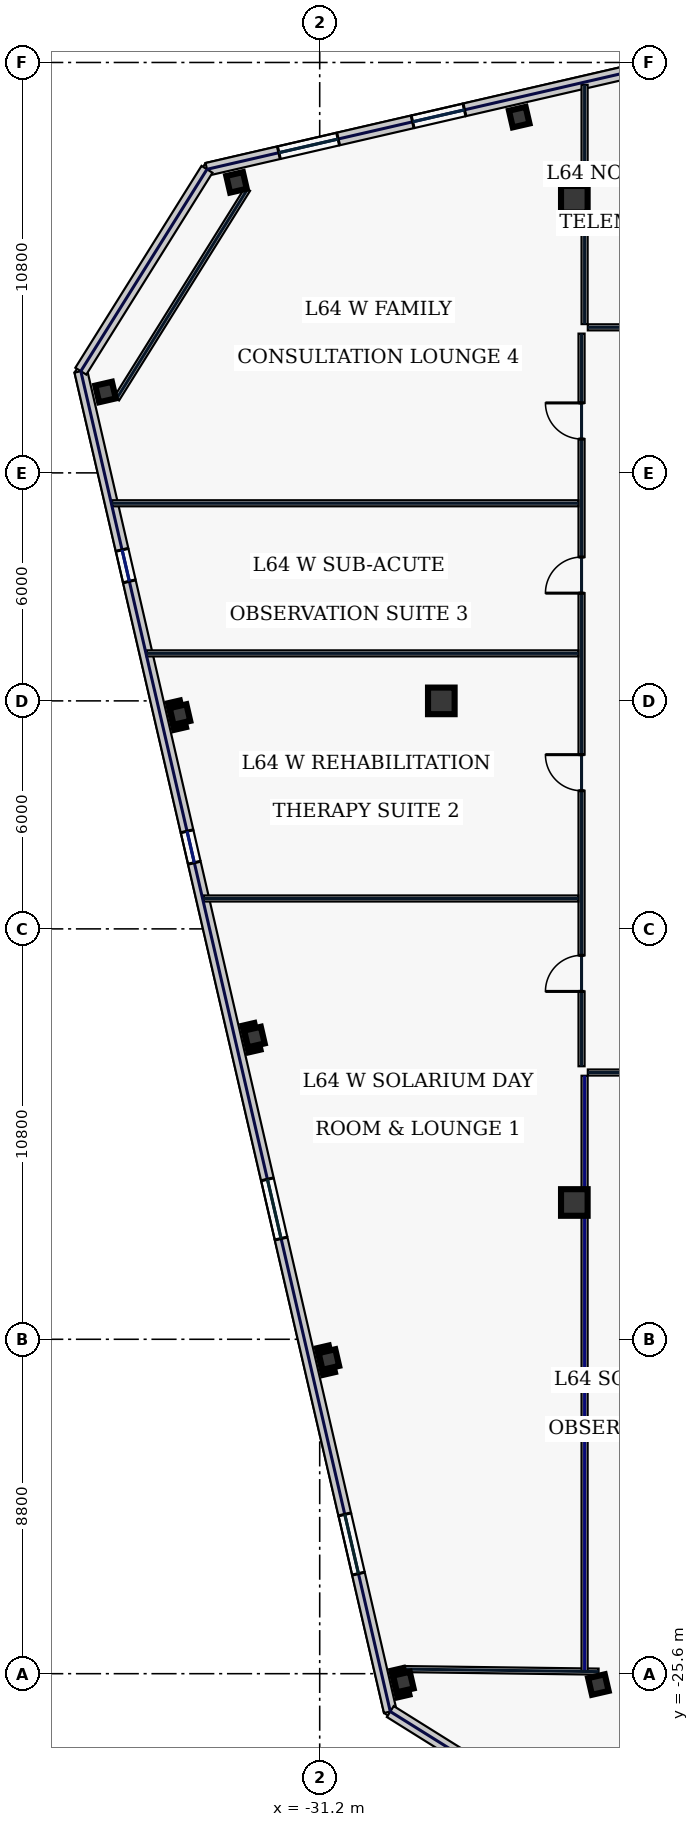
"""IFC4 building model, lengths in metres.
Left out: names, types, materials, properties, quantities, classifications, styles, units other than length and angle.
Written with IfcOpenShell. Run it as: python <this file> out.ifc"""

import sys

from ifc_helpers import new_model, si_unit, direction, frame, frame_2d, origin, origin_2d, place, context, subcontext, project, spatial, rectangle, hollow_rectangle, extrude, element, fill, save


model = new_model("IFC4")
c1 = context("Model", 3, precision=1e-05, world=origin(), true_north=direction((0.0, 1.0)))
c2 = subcontext(c1, "Body", "Model", "MODEL_VIEW")
j1 = project(units=[si_unit("LENGTHUNIT", "METRE"), si_unit("PLANEANGLEUNIT", "RADIAN")], contexts=[c1])
p1 = place(None, origin())
s1 = spatial("IfcSite", under=j1, at=p1, CompositionType="ELEMENT")
p2 = place(p1, origin())
s2 = spatial("IfcBuilding", under=s1, at=p2, CompositionType="ELEMENT")
p3 = place(p2, frame((0.0, 0.0, 277.0)))
s3 = spatial("IfcBuildingStorey", under=s2, at=p3, CompositionType="ELEMENT", Elevation=277.0)
for number, where, z_axis, x_axis in (
    (1, (-24.5, -13.2, 0.0), (0.0, 0.0, 1.0), (1.0, 0.0, 0.0)),
    (2, (-24.5, 13.2, 0.0), (0.0, 0.0, 1.0), (1.0, 0.0, 0.0)),
    (3, (-28.0, 0.0, 0.0), (0.0, 0.0, 1.0), (1.0, 0.0, 0.0)),
):
    element("IfcColumn", number, at=place(p3, frame(where, z_axis=z_axis, x_axis=x_axis)), inside=s3, PredefinedType="COLUMN", context=c2, shape_type="SweptSolid", body=[
        extrude(hollow_rectangle(XDim=0.7, YDim=0.7, WallThickness=0.032, at=origin_2d()), origin(), (0.0, 0.0, 1.0), 3.74),
    ])
for number, where, z_axis, x_axis in (
    (4, (-23.867, -25.886, 0.0), (0.0, 0.0, 1.0), (0.974, 0.225, 0.0)),
    (5, (-25.95, 15.362, 0.0), (0.0, 0.0, 1.0), (0.974, 0.225, 0.0)),
    (6, (-33.389, 13.645, 0.0), (0.0, 0.0, 1.0), (0.974, 0.225, 0.0)),
    (7, (-36.836, 8.128, 0.0), (0.0, 0.0, 1.0), (0.974, 0.225, 0.0)),
    (8, (-34.877, -0.359, 0.0), (0.0, 0.0, 1.0), (0.974, 0.225, 0.0)),
    (9, (-32.917, -8.845, 0.0), (0.0, 0.0, 1.0), (0.974, 0.225, 0.0)),
    (10, (-30.958, -17.332, 0.0), (0.0, 0.0, 1.0), (0.974, 0.225, 0.0)),
    (11, (-28.999, -25.819, 0.0), (0.0, 0.0, 1.0), (0.974, 0.225, 0.0)),
):
    element("IfcColumn", number, at=place(p3, frame(where, z_axis=z_axis, x_axis=x_axis)), inside=s3, PredefinedType="COLUMN", context=c2, shape_type="SweptSolid", body=[
        extrude(hollow_rectangle(XDim=0.45, YDim=0.45, WallThickness=0.022, at=origin_2d()), origin(), (0.0, 0.0, 1.0), 3.74),
    ])
p4 = place(p3, frame((-24.03, -29.916, 0.0), z_axis=(0.0, 0.0, 1.0), x_axis=(0.974371201193, 0.224946131964, 0.0)))
e12 = element("IfcWall", 12, at=p4, inside=s3, PredefinedType="STANDARD", context=c2, shape_type="SweptSolid", body=[
    extrude(rectangle(XDim=12.35, YDim=0.34, at=frame_2d((6.175, 0.0))), origin(), (0.0, 0.0, 1.0), 3.74),
])
p5 = place(p4, frame((2.35, 0.0, 0.9)))
e13 = element("IfcOpeningElement", 13, at=p5, cuts=e12, PredefinedType="OPENING", context=c2, shape_type="SweptSolid", body=[
    extrude(rectangle(XDim=1.5, YDim=2.0, at=frame_2d((0.75, 1.0))), frame((0.0, 0.18, 0.0), z_axis=(0.0, -1.0, 0.0), x_axis=(1.0, 0.0, 0.0)), (0.0, 0.0, 1.0), 0.36),
])
p6 = place(p4, frame((5.817, 0.0, 0.9)))
e14 = element("IfcOpeningElement", 14, at=p6, cuts=e12, PredefinedType="OPENING", context=c2, shape_type="SweptSolid", body=[
    extrude(rectangle(XDim=1.5, YDim=2.0, at=frame_2d((0.75, 1.0))), frame((0.0, 0.18, 0.0), z_axis=(0.0, -1.0, 0.0), x_axis=(1.0, 0.0, 0.0)), (0.0, 0.0, 1.0), 0.36),
])
p7 = place(p4, frame((9.886, 0.0, 0.9)))
e15 = element("IfcOpeningElement", 15, at=p7, cuts=e12, PredefinedType="OPENING", context=c2, shape_type="SweptSolid", body=[
    extrude(rectangle(XDim=1.5, YDim=2.0, at=frame_2d((0.75, 1.0))), frame((0.0, 0.18, 0.0), z_axis=(0.0, -1.0, 0.0), x_axis=(1.0, 0.0, 0.0)), (0.0, 0.0, 1.0), 0.36),
])
p8 = place(p3, frame((-17.245, 17.895, 0.0), z_axis=(0.0, 0.0, 1.0), x_axis=(-0.97437318493, -0.224937539085, 0.0)))
e16 = element("IfcWall", 16, at=p8, inside=s3, PredefinedType="STANDARD", context=c2, shape_type="SweptSolid", body=[
    extrude(rectangle(XDim=17.366, YDim=0.34, at=frame_2d((8.683, 0.0))), origin(), (0.0, 0.0, 1.0), 3.74),
])
p9 = place(p8, frame((13.825, 0.0, 0.22)))
e17 = element("IfcOpeningElement", 17, at=p9, cuts=e16, PredefinedType="OPENING", context=c2, shape_type="SweptSolid", body=[
    extrude(rectangle(XDim=1.6, YDim=1.2, at=frame_2d((0.8, 0.6))), frame((0.0, 0.18, 0.0), z_axis=(0.0, -1.0, 0.0), x_axis=(1.0, 0.0, 0.0)), (0.0, 0.0, 1.0), 0.36),
])
p10 = place(p8, frame((10.413, 0.0, 1.0)))
e18 = element("IfcOpeningElement", 18, at=p10, cuts=e16, PredefinedType="OPENING", context=c2, shape_type="SweptSolid", body=[
    extrude(rectangle(XDim=1.4, YDim=1.85, at=frame_2d((0.7, 0.925))), frame((0.0, 0.18, 0.0), z_axis=(0.0, -1.0, 0.0), x_axis=(1.0, 0.0, 0.0)), (0.0, 0.0, 1.0), 0.36),
])
p11 = place(p8, frame((3.329, 0.0, 1.0)))
e19 = element("IfcOpeningElement", 19, at=p11, cuts=e16, PredefinedType="OPENING", context=c2, shape_type="SweptSolid", body=[
    extrude(rectangle(XDim=0.85, YDim=1.85, at=frame_2d((0.425, 0.925))), frame((0.0, 0.18, 0.0), z_axis=(0.0, -1.0, 0.0), x_axis=(1.0, 0.0, 0.0)), (0.0, 0.0, 1.0), 0.36),
])
p12 = place(p3, frame((-37.486, 8.676, 0.0), z_axis=(0.0, 0.0, 1.0), x_axis=(0.224953091034, -0.974369594576, 0.0)))
e20 = element("IfcWall", 20, at=p12, inside=s3, PredefinedType="STANDARD", context=c2, shape_type="SweptSolid", body=[
    extrude(rectangle(XDim=36.2, YDim=0.34, at=frame_2d((18.1, 0.0))), origin(), (0.0, 0.0, 1.0), 3.74),
])
p13 = place(p12, frame((4.825, 0.0, 0.75)))
e21 = element("IfcOpeningElement", 21, at=p13, cuts=e20, PredefinedType="OPENING", context=c2, shape_type="SweptSolid", body=[
    extrude(rectangle(XDim=0.85, YDim=1.85, at=frame_2d((0.425, 0.925))), frame((0.0, 0.18, 0.0), z_axis=(0.0, -1.0, 0.0), x_axis=(1.0, 0.0, 0.0)), (0.0, 0.0, 1.0), 0.36),
])
p14 = place(p12, frame((12.425, 0.0, 0.75)))
e22 = element("IfcOpeningElement", 22, at=p14, cuts=e20, PredefinedType="OPENING", context=c2, shape_type="SweptSolid", body=[
    extrude(rectangle(XDim=0.85, YDim=1.85, at=frame_2d((0.425, 0.925))), frame((0.0, 0.18, 0.0), z_axis=(0.0, -1.0, 0.0), x_axis=(1.0, 0.0, 0.0)), (0.0, 0.0, 1.0), 0.36),
])
p15 = place(p12, frame((21.825, 0.0, 0.58)))
e23 = element("IfcOpeningElement", 23, at=p15, cuts=e20, PredefinedType="OPENING", context=c2, shape_type="SweptSolid", body=[
    extrude(rectangle(XDim=1.6, YDim=2.3, at=frame_2d((0.8, 1.15))), frame((0.0, 0.18, 0.0), z_axis=(0.0, -1.0, 0.0), x_axis=(1.0, 0.0, 0.0)), (0.0, 0.0, 1.0), 0.36),
])
p16 = place(p12, frame((30.875, 0.0, 0.58)))
e24 = element("IfcOpeningElement", 24, at=p16, cuts=e20, PredefinedType="OPENING", context=c2, shape_type="SweptSolid", body=[
    extrude(rectangle(XDim=1.6, YDim=2.3, at=frame_2d((0.8, 1.15))), frame((0.0, 0.18, 0.0), z_axis=(0.0, -1.0, 0.0), x_axis=(1.0, 0.0, 0.0)), (0.0, 0.0, 1.0), 0.36),
])
for number, where, z_axis, x_axis in (
    (25, (-34.166, 13.989, 0.0), (0.0, 0.0, 1.0), (-0.53, -0.848, 0.0)),
    (26, (-29.343, -26.596, 0.0), (0.0, 0.0, 1.0), (0.848, -0.53, 0.0)),
):
    element("IfcWall", number, at=place(p3, frame(where, z_axis=z_axis, x_axis=x_axis)), inside=s3, PredefinedType="STANDARD", context=c2, shape_type="SweptSolid", body=[
        extrude(rectangle(XDim=6.265, YDim=0.34, at=frame_2d((3.133, 0.0))), origin(), (0.0, 0.0, 1.0), 3.74),
    ])
p17 = place(p3, frame((-33.1, 13.465, 0.0), z_axis=(0.0, 0.0, 1.0), x_axis=(-0.529958457806, -0.848023604035, 0.0)))
e27 = element("IfcWall", 27, at=p17, inside=s3, PredefinedType="PARTITIONING", context=c2, shape_type="SweptSolid", body=[
    extrude(rectangle(XDim=6.505, YDim=0.16, at=frame_2d((3.252, 0.0))), origin(), (0.0, 0.0, 1.0), 3.74),
])
p18 = place(p3, frame((-28.994, -25.479, 0.0), z_axis=(0.0, 0.0, 1.0), x_axis=(0.999915052546, -0.01303409726, 0.0)))
e28 = element("IfcWall", 28, at=p18, inside=s3, PredefinedType="PARTITIONING", context=c2, shape_type="SweptSolid", body=[
    extrude(rectangle(XDim=5.132, YDim=0.16, at=frame_2d((2.566, 0.0))), origin(), (0.0, 0.0, 1.0), 3.74),
])
p19 = place(p3, frame((-24.31, -9.615, 0.0), z_axis=(0.0, 0.0, 1.0), x_axis=(0.0, 1.0, 0.0)))
e29 = element("IfcWall", 29, at=p19, inside=s3, PredefinedType="PARTITIONING", context=c2, shape_type="SweptSolid", body=[
    extrude(rectangle(XDim=19.28, YDim=0.16, at=frame_2d((9.64, 0.0))), origin(), (0.0, 0.0, 1.0), 3.74),
])
p20 = place(p19, frame((1.969, 0.0, 0.0)))
e30 = element("IfcOpeningElement", 30, at=p20, cuts=e29, PredefinedType="OPENING", context=c2, shape_type="SweptSolid", body=[
    extrude(rectangle(XDim=0.95, YDim=2.2, at=frame_2d((0.475, 1.1))), frame((0.0, 0.09, 0.0), z_axis=(0.0, -1.0, 0.0), x_axis=(1.0, 0.0, 0.0)), (0.0, 0.0, 1.0), 0.18),
])
p21 = place(p19, frame((7.25, 0.0, 0.0)))
e31 = element("IfcOpeningElement", 31, at=p21, cuts=e29, PredefinedType="OPENING", context=c2, shape_type="SweptSolid", body=[
    extrude(rectangle(XDim=0.95, YDim=2.2, at=frame_2d((0.475, 1.1))), frame((0.0, 0.09, 0.0), z_axis=(0.0, -1.0, 0.0), x_axis=(1.0, 0.0, 0.0)), (0.0, 0.0, 1.0), 0.18),
])
p22 = place(p19, frame((12.45, 0.0, 0.0)))
e32 = element("IfcOpeningElement", 32, at=p22, cuts=e29, PredefinedType="OPENING", context=c2, shape_type="SweptSolid", body=[
    extrude(rectangle(XDim=0.95, YDim=2.2, at=frame_2d((0.475, 1.1))), frame((0.0, 0.09, 0.0), z_axis=(0.0, -1.0, 0.0), x_axis=(1.0, 0.0, 0.0)), (0.0, 0.0, 1.0), 0.18),
])
p23 = place(p19, frame((16.506, 0.0, 0.0)))
e33 = element("IfcOpeningElement", 33, at=p23, cuts=e29, PredefinedType="OPENING", context=c2, shape_type="SweptSolid", body=[
    extrude(rectangle(XDim=0.95, YDim=2.2, at=frame_2d((0.475, 1.1))), frame((0.0, 0.09, 0.0), z_axis=(0.0, -1.0, 0.0), x_axis=(1.0, 0.0, 0.0)), (0.0, 0.0, 1.0), 0.18),
])
p24 = place(p3, frame((-24.145, 9.83, 0.0), z_axis=(0.0, 0.0, 1.0), x_axis=(1.0, 0.0, 0.0)))
e34 = element("IfcWall", 34, at=p24, inside=s3, PredefinedType="PARTITIONING", context=c2, shape_type="SweptSolid", body=[
    extrude(rectangle(XDim=48.29, YDim=0.16, at=frame_2d((24.145, 0.0))), origin(), (0.0, 0.0, 1.0), 3.74),
])
p25 = place(p24, frame((1.869, 0.0, 0.0)))
e35 = element("IfcOpeningElement", 35, at=p25, cuts=e34, PredefinedType="OPENING", context=c2, shape_type="SweptSolid", body=[
    extrude(rectangle(XDim=1.3, YDim=2.2, at=frame_2d((0.65, 1.1))), frame((0.0, 0.09, 0.0), z_axis=(0.0, -1.0, 0.0), x_axis=(1.0, 0.0, 0.0)), (0.0, 0.0, 1.0), 0.18),
])
p26 = place(p24, frame((9.565, 0.0, 0.0)))
e36 = element("IfcOpeningElement", 36, at=p26, cuts=e34, PredefinedType="OPENING", context=c2, shape_type="SweptSolid", body=[
    extrude(rectangle(XDim=1.05, YDim=2.2, at=frame_2d((0.525, 1.1))), frame((0.0, 0.09, 0.0), z_axis=(0.0, -1.0, 0.0), x_axis=(1.0, 0.0, 0.0)), (0.0, 0.0, 1.0), 0.18),
])
p27 = place(p24, frame((18.14, 0.0, 0.0)))
e37 = element("IfcOpeningElement", 37, at=p27, cuts=e34, PredefinedType="OPENING", context=c2, shape_type="SweptSolid", body=[
    extrude(rectangle(XDim=0.95, YDim=2.2, at=frame_2d((0.475, 1.1))), frame((0.0, 0.09, 0.0), z_axis=(0.0, -1.0, 0.0), x_axis=(1.0, 0.0, 0.0)), (0.0, 0.0, 1.0), 0.18),
])
p28 = place(p24, frame((26.58, 0.0, 0.0)))
e38 = element("IfcOpeningElement", 38, at=p28, cuts=e34, PredefinedType="OPENING", context=c2, shape_type="SweptSolid", body=[
    extrude(rectangle(XDim=0.95, YDim=2.2, at=frame_2d((0.475, 1.1))), frame((0.0, 0.09, 0.0), z_axis=(0.0, -1.0, 0.0), x_axis=(1.0, 0.0, 0.0)), (0.0, 0.0, 1.0), 0.18),
])
p29 = place(p24, frame((33.5, 0.0, 0.0)))
e39 = element("IfcOpeningElement", 39, at=p29, cuts=e34, PredefinedType="OPENING", context=c2, shape_type="SweptSolid", body=[
    extrude(rectangle(XDim=1.3, YDim=2.2, at=frame_2d((0.65, 1.1))), frame((0.0, 0.09, 0.0), z_axis=(0.0, -1.0, 0.0), x_axis=(1.0, 0.0, 0.0)), (0.0, 0.0, 1.0), 0.18),
])
p30 = place(p24, frame((40.09, 0.0, 0.0)))
e40 = element("IfcOpeningElement", 40, at=p30, cuts=e34, PredefinedType="OPENING", context=c2, shape_type="SweptSolid", body=[
    extrude(rectangle(XDim=1.45, YDim=2.2, at=frame_2d((0.725, 1.1))), frame((0.0, 0.09, 0.0), z_axis=(0.0, -1.0, 0.0), x_axis=(1.0, 0.0, 0.0)), (0.0, 0.0, 1.0), 0.18),
])
p31 = place(p24, frame((45.291, 0.0, 0.0)))
e41 = element("IfcOpeningElement", 41, at=p31, cuts=e34, PredefinedType="OPENING", context=c2, shape_type="SweptSolid", body=[
    extrude(rectangle(XDim=1.3, YDim=2.2, at=frame_2d((0.65, 1.1))), frame((0.0, 0.09, 0.0), z_axis=(0.0, -1.0, 0.0), x_axis=(1.0, 0.0, 0.0)), (0.0, 0.0, 1.0), 0.18),
])
p32 = place(p3, frame((-15.065, -9.78, 0.0), z_axis=(0.0, 0.0, 1.0), x_axis=(-1.0, 0.0, 0.0)))
e42 = element("IfcWall", 42, at=p32, inside=s3, PredefinedType="PARTITIONING", context=c2, shape_type="SweptSolid", body=[
    extrude(rectangle(XDim=9.08, YDim=0.16, at=frame_2d((4.54, 0.0))), origin(), (0.0, 0.0, 1.0), 3.74),
])
p33 = place(p32, frame((6.081, 0.0, 0.0)))
e43 = element("IfcOpeningElement", 43, at=p33, cuts=e42, PredefinedType="OPENING", context=c2, shape_type="SweptSolid", body=[
    extrude(rectangle(XDim=1.3, YDim=2.2, at=frame_2d((0.65, 1.1))), frame((0.0, 0.09, 0.0), z_axis=(0.0, -1.0, 0.0), x_axis=(1.0, 0.0, 0.0)), (0.0, 0.0, 1.0), 0.18),
])
p34 = place(p3, frame((-24.23, 9.915, 0.0), z_axis=(0.0, 0.0, 1.0), x_axis=(0.0, 1.0, 0.0)))
e44 = element("IfcWall", 44, at=p34, inside=s3, PredefinedType="PARTITIONING", context=c2, shape_type="SweptSolid", body=[
    extrude(rectangle(XDim=6.296, YDim=0.16, at=frame_2d((3.148, 0.0))), origin(), (0.0, 0.0, 1.0), 3.74),
])
p35 = place(p3, frame((-24.23, -25.536, 0.0), z_axis=(0.0, 0.0, 1.0), x_axis=(0.0, 1.0, 0.0)))
e45 = element("IfcWall", 45, at=p35, inside=s3, PredefinedType="PARTITIONING", context=c2, shape_type="SweptSolid", body=[
    extrude(rectangle(XDim=15.671, YDim=0.16, at=frame_2d((7.835, 0.0))), origin(), (0.0, 0.0, 1.0), 2.135),
])
p36 = place(p3, frame((-34.262, -5.2, 0.0), z_axis=(0.0, 0.0, 1.0), x_axis=(1.0, 0.0, 0.0)))
e46 = element("IfcWall", 46, at=p36, inside=s3, PredefinedType="PARTITIONING", context=c2, shape_type="SweptSolid", body=[
    extrude(rectangle(XDim=9.867, YDim=0.16, at=frame_2d((4.933, 0.0))), origin(), (0.0, 0.0, 1.0), 3.74),
])
p37 = place(p3, frame((-35.751, 1.25, 0.0), z_axis=(0.0, 0.0, 1.0), x_axis=(1.0, 0.0, 0.0)))
e47 = element("IfcWall", 47, at=p37, inside=s3, PredefinedType="PARTITIONING", context=c2, shape_type="SweptSolid", body=[
    extrude(rectangle(XDim=11.356, YDim=0.16, at=frame_2d((5.678, 0.0))), origin(), (0.0, 0.0, 1.0), 3.74),
])
p38 = place(p3, frame((-36.663, 5.2, 0.0), z_axis=(0.0, 0.0, 1.0), x_axis=(1.0, 0.0, 0.0)))
e48 = element("IfcWall", 48, at=p38, inside=s3, PredefinedType="PARTITIONING", context=c2, shape_type="SweptSolid", body=[
    extrude(rectangle(XDim=12.268, YDim=0.16, at=frame_2d((6.134, 0.0))), origin(), (0.0, 0.0, 1.0), 3.74),
])
p39 = place(p9, origin())
e49 = element("IfcWindow", 49, at=p39, inside=s3, PartitioningType="SINGLE_PANEL", PredefinedType="WINDOW", context=c2, shape_type="SweptSolid", body=[
    extrude(rectangle(XDim=1.6, YDim=1.2, at=frame_2d((0.8, 0.6))), frame((0.0, 0.03, 0.0), z_axis=(0.0, -1.0, 0.0), x_axis=(1.0, 0.0, 0.0)), (0.0, 0.0, 1.0), 0.06),
])
fill(e17, e49)
p40 = place(p10, origin())
e50 = element("IfcWindow", 50, at=p40, inside=s3, PartitioningType="SINGLE_PANEL", PredefinedType="WINDOW", context=c2, shape_type="SweptSolid", body=[
    extrude(rectangle(XDim=1.4, YDim=1.85, at=frame_2d((0.7, 0.925))), frame((0.0, 0.03, 0.0), z_axis=(0.0, -1.0, 0.0), x_axis=(1.0, 0.0, 0.0)), (0.0, 0.0, 1.0), 0.06),
])
fill(e18, e50)
p41 = place(p13, origin())
e51 = element("IfcWindow", 51, at=p41, inside=s3, PartitioningType="SINGLE_PANEL", PredefinedType="WINDOW", context=c2, shape_type="SweptSolid", body=[
    extrude(rectangle(XDim=0.85, YDim=1.85, at=frame_2d((0.425, 0.925))), frame((0.0, 0.03, 0.0), z_axis=(0.0, -1.0, 0.0), x_axis=(1.0, 0.0, 0.0)), (0.0, 0.0, 1.0), 0.06),
])
fill(e21, e51)
p42 = place(p14, origin())
e52 = element("IfcWindow", 52, at=p42, inside=s3, PartitioningType="SINGLE_PANEL", PredefinedType="WINDOW", context=c2, shape_type="SweptSolid", body=[
    extrude(rectangle(XDim=0.85, YDim=1.85, at=frame_2d((0.425, 0.925))), frame((0.0, 0.03, 0.0), z_axis=(0.0, -1.0, 0.0), x_axis=(1.0, 0.0, 0.0)), (0.0, 0.0, 1.0), 0.06),
])
fill(e22, e52)
p43 = place(p15, origin())
e53 = element("IfcWindow", 53, at=p43, inside=s3, PartitioningType="SINGLE_PANEL", PredefinedType="WINDOW", context=c2, shape_type="SweptSolid", body=[
    extrude(rectangle(XDim=1.6, YDim=2.3, at=frame_2d((0.8, 1.15))), frame((0.0, 0.03, 0.0), z_axis=(0.0, -1.0, 0.0), x_axis=(1.0, 0.0, 0.0)), (0.0, 0.0, 1.0), 0.06),
])
fill(e23, e53)
p44 = place(p16, origin())
e54 = element("IfcWindow", 54, at=p44, inside=s3, PartitioningType="SINGLE_PANEL", PredefinedType="WINDOW", context=c2, shape_type="SweptSolid", body=[
    extrude(rectangle(XDim=1.6, YDim=2.3, at=frame_2d((0.8, 1.15))), frame((0.0, 0.03, 0.0), z_axis=(0.0, -1.0, 0.0), x_axis=(1.0, 0.0, 0.0)), (0.0, 0.0, 1.0), 0.06),
])
fill(e24, e54)
p45 = place(p20, origin())
e55 = element("IfcDoor", 55, at=p45, inside=s3, OperationType="SINGLE_SWING_LEFT", PredefinedType="DOOR", context=c2, shape_type="SweptSolid", body=[
    extrude(rectangle(XDim=0.95, YDim=2.2, at=frame_2d((0.475, 1.1))), frame((0.0, 0.025, 0.0), z_axis=(0.0, -1.0, 0.0), x_axis=(1.0, 0.0, 0.0)), (0.0, 0.0, 1.0), 0.05),
])
fill(e30, e55)
p46 = place(p21, origin())
e56 = element("IfcDoor", 56, at=p46, inside=s3, OperationType="SINGLE_SWING_RIGHT", PredefinedType="DOOR", context=c2, shape_type="SweptSolid", body=[
    extrude(rectangle(XDim=0.95, YDim=2.2, at=frame_2d((0.475, 1.1))), frame((0.0, 0.025, 0.0), z_axis=(0.0, -1.0, 0.0), x_axis=(1.0, 0.0, 0.0)), (0.0, 0.0, 1.0), 0.05),
])
fill(e31, e56)
p47 = place(p22, origin())
e57 = element("IfcDoor", 57, at=p47, inside=s3, OperationType="SINGLE_SWING_LEFT", PredefinedType="DOOR", context=c2, shape_type="SweptSolid", body=[
    extrude(rectangle(XDim=0.95, YDim=2.2, at=frame_2d((0.475, 1.1))), frame((0.0, 0.025, 0.0), z_axis=(0.0, -1.0, 0.0), x_axis=(1.0, 0.0, 0.0)), (0.0, 0.0, 1.0), 0.05),
])
fill(e32, e57)
p48 = place(p23, origin())
e58 = element("IfcDoor", 58, at=p48, inside=s3, OperationType="SINGLE_SWING_RIGHT", PredefinedType="DOOR", context=c2, shape_type="SweptSolid", body=[
    extrude(rectangle(XDim=0.95, YDim=2.2, at=frame_2d((0.475, 1.1))), frame((0.0, 0.025, 0.0), z_axis=(0.0, -1.0, 0.0), x_axis=(1.0, 0.0, 0.0)), (0.0, 0.0, 1.0), 0.05),
])
fill(e33, e58)
save(model, sys.argv[1])
